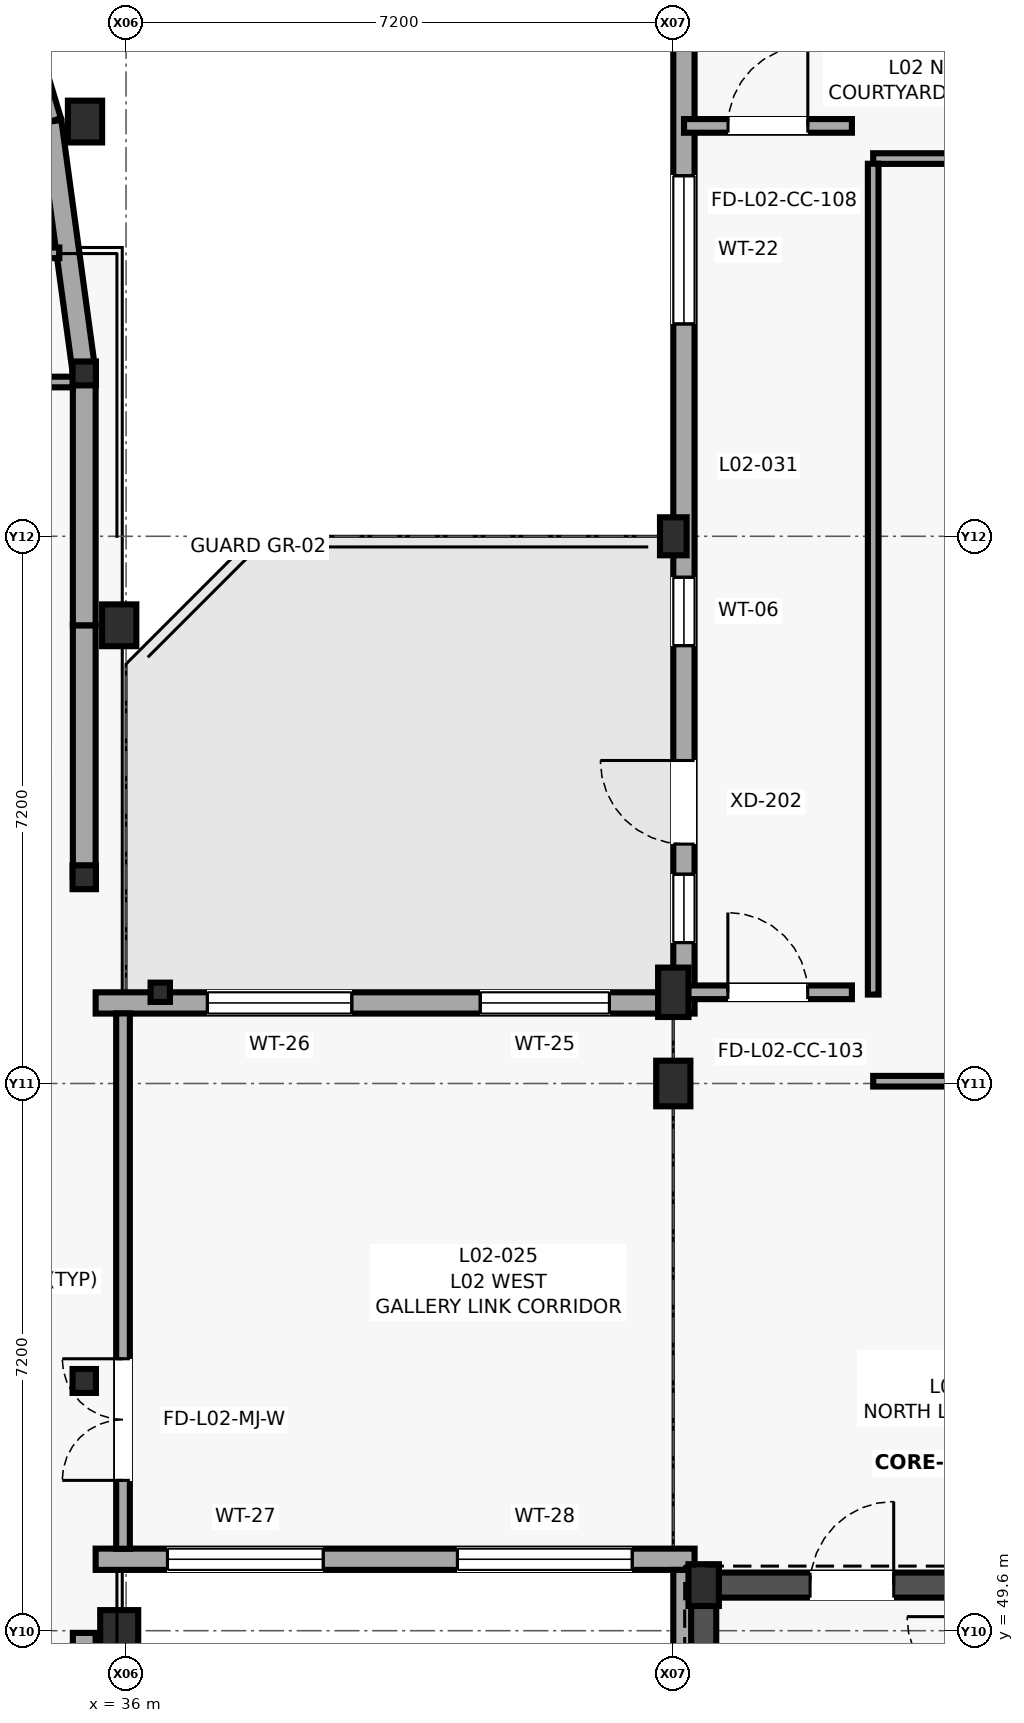
"""IFC4 building model, lengths in metres.
Left out: names, types, materials, properties, quantities, classifications, styles, units other than length and angle.
Written with IfcOpenShell. Run it as: python <this file> out.ifc"""

import sys

from ifc_helpers import new_model, si_unit, direction, frame, frame_2d, origin, origin_2d, place, context, subcontext, project, spatial, rectangle, i_section, extrude, element, fill, save


model = new_model("IFC4")
c1 = context("Model", 3, precision=1e-05, world=origin(), true_north=direction((0.0, 1.0)))
c2 = subcontext(c1, "Body", "Model", "MODEL_VIEW")
j1 = project(units=[si_unit("LENGTHUNIT", "METRE"), si_unit("PLANEANGLEUNIT", "RADIAN")], contexts=[c1])
p1 = place(None, origin())
s1 = spatial("IfcSite", under=j1, at=p1, CompositionType="ELEMENT")
p2 = place(p1, origin())
s2 = spatial("IfcBuilding", under=s1, at=p2, CompositionType="ELEMENT")
p3 = place(p2, frame((0.0, 0.0, 8.2)))
s3 = spatial("IfcBuildingStorey", under=s2, at=p3, CompositionType="ELEMENT", Elevation=8.2)
for number, where, z_axis, x_axis in (
    (1, (35.45, 52.886, 0.0), (0.0, 0.0, 1.0), (1.0, 0.0, 0.0)),
    (2, (35.45, 59.514, 0.0), (0.0, 0.0, 1.0), (1.0, 0.0, 0.0)),
    (3, (35.45, 66.143, 0.0), (0.0, 0.0, 1.0), (1.0, 0.0, 0.0)),
):
    element("IfcColumn", number, at=place(p3, frame(where, z_axis=z_axis, x_axis=x_axis)), inside=s3, PredefinedType="COLUMN", context=c2, shape_type="SweptSolid", body=[
        extrude(i_section(OverallWidth=0.307, OverallDepth=0.314, WebThickness=0.012, FlangeThickness=0.019, FilletRadius=0.015, at=origin_2d()), origin(), (0.0, 0.0, 1.0), 4.0),
    ])
p4 = place(p3, frame((35.46, 69.457, 0.0), z_axis=(0.0, 0.0, 1.0), x_axis=(1.0, 0.0, 0.0)))
e4 = element("IfcColumn", 4, at=p4, inside=s3, PredefinedType="PILASTER", context=c2, shape_type="SweptSolid", body=[
    extrude(rectangle(XDim=0.45, YDim=0.55, at=origin_2d()), origin(), (0.0, 0.0, 1.0), 4.0),
])
p5 = place(p3, frame((35.91, 49.571, 0.0), z_axis=(0.0, 0.0, 1.0), x_axis=(1.0, 0.0, 0.0)))
e5 = element("IfcColumn", 5, at=p5, inside=s3, PredefinedType="PILASTER", context=c2, shape_type="SweptSolid", body=[
    extrude(rectangle(XDim=0.5, YDim=0.6, at=origin_2d()), origin(), (0.0, 0.0, 1.0), 4.0),
])
p6 = place(p3, frame((35.91, 62.829, 0.0), z_axis=(0.0, 0.0, 1.0), x_axis=(1.0, 0.0, 0.0)))
e6 = element("IfcColumn", 6, at=p6, inside=s3, PredefinedType="PILASTER", context=c2, shape_type="SweptSolid", body=[
    extrude(rectangle(XDim=0.45, YDim=0.55, at=origin_2d()), origin(), (0.0, 0.0, 1.0), 4.0),
])
p7 = place(p3, frame((36.45, 58.0, 0.0), z_axis=(0.0, 0.0, 1.0), x_axis=(1.0, 0.0, 0.0)))
e7 = element("IfcColumn", 7, at=p7, inside=s3, PredefinedType="COLUMN", context=c2, shape_type="SweptSolid", body=[
    extrude(i_section(OverallWidth=0.255, OverallDepth=0.254, WebThickness=0.009, FlangeThickness=0.014, FilletRadius=0.013, at=origin_2d()), origin(), (0.0, 0.0, 1.0), 4.0),
])
p8 = place(p3, frame((43.2, 56.8, 0.0), z_axis=(0.0, 0.0, 1.0), x_axis=(1.0, 0.0, 0.0)))
e8 = element("IfcColumn", 8, at=p8, inside=s3, PredefinedType="COLUMN", context=c2, shape_type="SweptSolid", body=[
    extrude(rectangle(XDim=0.45, YDim=0.6, at=origin_2d()), origin(), (0.0, 0.0, 1.0), 4.0),
])
p9 = place(p3, frame((43.2, 58.0, 0.0), z_axis=(0.0, 0.0, 1.0), x_axis=(1.0, 0.0, 0.0)))
e9 = element("IfcColumn", 9, at=p9, inside=s3, PredefinedType="COLUMN", context=c2, shape_type="SweptSolid", body=[
    extrude(rectangle(XDim=0.4, YDim=0.65, at=origin_2d()), origin(), (0.0, 0.0, 1.0), 4.0),
])
p10 = place(p3, frame((43.2, 64.0, 0.0), z_axis=(0.0, 0.0, 1.0), x_axis=(1.0, 0.0, 0.0)))
e10 = element("IfcColumn", 10, at=p10, inside=s3, PredefinedType="PILASTER", context=c2, shape_type="SweptSolid", body=[
    extrude(rectangle(XDim=0.35, YDim=0.5, at=origin_2d()), origin(), (0.0, 0.0, 1.0), 4.0),
])
p11 = place(p3, frame((43.6, 50.2, 0.0), z_axis=(0.0, 0.0, 1.0), x_axis=(1.0, 0.0, 0.0)))
e11 = element("IfcColumn", 11, at=p11, inside=s3, PredefinedType="COLUMN", context=c2, shape_type="SweptSolid", body=[
    extrude(rectangle(XDim=0.4, YDim=0.55, at=origin_2d()), origin(), (0.0, 0.0, 1.0), 4.0),
])
p12 = place(p3, frame((35.45, 46.257, 0.0), z_axis=(0.0, 0.0, 1.0), x_axis=(0.0, 1.0, 0.0)))
e12 = element("IfcWall", 12, at=p12, inside=s3, PredefinedType="SOLIDWALL", context=c2, shape_type="SweptSolid", body=[
    extrude(rectangle(XDim=3.314, YDim=0.3, at=frame_2d((1.657, 0.0))), origin(), (0.0, 0.0, 1.0), 3.505),
])
p13 = place(p3, frame((35.45, 59.514, 0.0), z_axis=(0.0, 0.0, 1.0), x_axis=(0.0, 1.0, 0.0)))
e13 = element("IfcWall", 13, at=p13, inside=s3, PredefinedType="SOLIDWALL", context=c2, shape_type="SweptSolid", body=[
    extrude(rectangle(XDim=3.315, YDim=0.3, at=frame_2d((1.658, 0.0))), origin(), (0.0, 0.0, 1.0), 3.505),
])
p14 = place(p3, frame((35.45, 62.829, 0.0), z_axis=(0.0, 0.0, 1.0), x_axis=(0.0, 1.0, 0.0)))
e14 = element("IfcWall", 14, at=p14, inside=s3, PredefinedType="SOLIDWALL", context=c2, shape_type="SweptSolid", body=[
    extrude(rectangle(XDim=3.314, YDim=0.3, at=frame_2d((1.657, 0.0))), origin(), (0.0, 0.0, 1.0), 3.505),
])
p15 = place(p3, frame((35.45, 66.143, 0.0), z_axis=(0.0, 0.0, 1.0), x_axis=(-0.134539839792, 0.990908185206, 0.0)))
e15 = element("IfcWall", 15, at=p15, inside=s3, PredefinedType="SOLIDWALL", context=c2, shape_type="SweptSolid", body=[
    extrude(rectangle(XDim=3.344, YDim=0.3, at=frame_2d((1.672, 0.0))), origin(), (0.0, 0.0, 1.0), 3.745),
])
p16 = place(p3, frame((35.0, 69.457, 0.0), z_axis=(0.0, 0.0, 1.0), x_axis=(-0.288887509039, 0.957363048755, 0.0)))
e16 = element("IfcWall", 16, at=p16, inside=s3, PredefinedType="SOLIDWALL", context=c2, shape_type="SweptSolid", body=[
    extrude(rectangle(XDim=3.462, YDim=0.3, at=frame_2d((1.731, 0.0))), origin(), (0.0, 0.0, 1.0), 3.745),
])
p17 = place(p3, frame((43.34, 77.538, 0.0), z_axis=(0.0, 0.0, 1.0), x_axis=(0.0, -1.0, 0.0)))
e17 = element("IfcWall", 17, at=p17, inside=s3, PredefinedType="SOLIDWALL", context=c2, shape_type="SweptSolid", body=[
    extrude(rectangle(XDim=19.538, YDim=0.28, at=frame_2d((9.769, 0.0))), origin(), (0.0, 0.0, 1.0), 3.225),
])
p18 = place(p17, frame((16.488, 0.0, 0.0)))
e18 = element("IfcOpeningElement", 18, at=p18, cuts=e17, PredefinedType="OPENING", context=c2, shape_type="SweptSolid", body=[
    extrude(rectangle(XDim=1.1, YDim=2.15, at=frame_2d((0.55, 1.075))), frame((0.0, 0.15, 0.0), z_axis=(0.0, -1.0, 0.0), x_axis=(1.0, 0.0, 0.0)), (0.0, 0.0, 1.0), 0.3),
])
p19 = place(p17, frame((1.354, 0.0, 0.85)))
e19 = element("IfcOpeningElement", 19, at=p19, cuts=e17, PredefinedType="OPENING", context=c2, shape_type="SweptSolid", body=[
    extrude(rectangle(XDim=1.2, YDim=1.65, at=frame_2d((0.6, 0.825))), frame((0.0, 0.15, 0.0), z_axis=(0.0, -1.0, 0.0), x_axis=(1.0, 0.0, 0.0)), (0.0, 0.0, 1.0), 0.3),
])
p20 = place(p17, frame((8.794, 0.0, 1.05)))
e20 = element("IfcOpeningElement", 20, at=p20, cuts=e17, PredefinedType="OPENING", context=c2, shape_type="SweptSolid", body=[
    extrude(rectangle(XDim=1.95, YDim=1.5, at=frame_2d((0.975, 0.75))), frame((0.0, 0.15, 0.0), z_axis=(0.0, -1.0, 0.0), x_axis=(1.0, 0.0, 0.0)), (0.0, 0.0, 1.0), 0.3),
])
p21 = place(p17, frame((14.077, 0.0, 1.05)))
e21 = element("IfcOpeningElement", 21, at=p21, cuts=e17, PredefinedType="OPENING", context=c2, shape_type="SweptSolid", body=[
    extrude(rectangle(XDim=0.9, YDim=1.5, at=frame_2d((0.45, 0.75))), frame((0.0, 0.15, 0.0), z_axis=(0.0, -1.0, 0.0), x_axis=(1.0, 0.0, 0.0)), (0.0, 0.0, 1.0), 0.3),
])
p22 = place(p17, frame((17.984, 0.0, 1.05)))
e22 = element("IfcOpeningElement", 22, at=p22, cuts=e17, PredefinedType="OPENING", context=c2, shape_type="SweptSolid", body=[
    extrude(rectangle(XDim=0.9, YDim=1.5, at=frame_2d((0.45, 0.75))), frame((0.0, 0.15, 0.0), z_axis=(0.0, -1.0, 0.0), x_axis=(1.0, 0.0, 0.0)), (0.0, 0.0, 1.0), 0.3),
])
p23 = place(p3, frame((43.48, 57.86, 0.0), z_axis=(0.0, 0.0, 1.0), x_axis=(-1.0, 0.0, 0.0)))
e23 = element("IfcWall", 23, at=p23, inside=s3, PredefinedType="SOLIDWALL", context=c2, shape_type="SweptSolid", body=[
    extrude(rectangle(XDim=7.88, YDim=0.28, at=frame_2d((3.94, 0.0))), origin(), (0.0, 0.0, 1.0), 2.96),
])
p24 = place(p23, frame((1.12, 0.0, 0.85)))
e24 = element("IfcOpeningElement", 24, at=p24, cuts=e23, PredefinedType="OPENING", context=c2, shape_type="SweptSolid", body=[
    extrude(rectangle(XDim=1.7, YDim=1.75, at=frame_2d((0.85, 0.875))), frame((0.0, 0.15, 0.0), z_axis=(0.0, -1.0, 0.0), x_axis=(1.0, 0.0, 0.0)), (0.0, 0.0, 1.0), 0.3),
])
p25 = place(p23, frame((4.51, 0.0, 0.85)))
e25 = element("IfcOpeningElement", 25, at=p25, cuts=e23, PredefinedType="OPENING", context=c2, shape_type="SweptSolid", body=[
    extrude(rectangle(XDim=1.9, YDim=1.65, at=frame_2d((0.95, 0.825))), frame((0.0, 0.15, 0.0), z_axis=(0.0, -1.0, 0.0), x_axis=(1.0, 0.0, 0.0)), (0.0, 0.0, 1.0), 0.3),
])
p26 = place(p3, frame((35.6, 50.54, 0.0), z_axis=(0.0, 0.0, 1.0), x_axis=(1.0, 0.0, 0.0)))
e26 = element("IfcWall", 26, at=p26, inside=s3, PredefinedType="SOLIDWALL", context=c2, shape_type="SweptSolid", body=[
    extrude(rectangle(XDim=7.88, YDim=0.28, at=frame_2d((3.94, 0.0))), origin(), (0.0, 0.0, 1.0), 3.78),
])
p27 = place(p26, frame((0.945, 0.0, 1.05)))
e27 = element("IfcOpeningElement", 27, at=p27, cuts=e26, PredefinedType="OPENING", context=c2, shape_type="SweptSolid", body=[
    extrude(rectangle(XDim=2.05, YDim=1.55, at=frame_2d((1.025, 0.775))), frame((0.0, 0.15, 0.0), z_axis=(0.0, -1.0, 0.0), x_axis=(1.0, 0.0, 0.0)), (0.0, 0.0, 1.0), 0.3),
])
p28 = place(p26, frame((4.76, 0.0, 1.05)))
e28 = element("IfcOpeningElement", 28, at=p28, cuts=e26, PredefinedType="OPENING", context=c2, shape_type="SweptSolid", body=[
    extrude(rectangle(XDim=2.3, YDim=1.45, at=frame_2d((1.15, 0.725))), frame((0.0, 0.15, 0.0), z_axis=(0.0, -1.0, 0.0), x_axis=(1.0, 0.0, 0.0)), (0.0, 0.0, 1.0), 0.3),
])
p29 = place(p3, frame((43.34, 50.4, 0.0), z_axis=(0.0, 0.0, 1.0), x_axis=(0.0, -1.0, 0.0)))
e29 = element("IfcWall", 29, at=p29, inside=s3, PredefinedType="SOLIDWALL", context=c2, shape_type="SweptSolid", body=[
    extrude(rectangle(XDim=8.12, YDim=0.28, at=frame_2d((4.06, 0.0))), origin(), (0.0, 0.0, 1.0), 3.78),
])
p30 = place(p3, frame((43.435, 50.2, 0.0), z_axis=(0.0, 0.0, 1.0), x_axis=(1.0, 0.0, 0.0)))
e30 = element("IfcWall", 30, at=p30, inside=s3, PredefinedType="SHEAR", context=c2, shape_type="SweptSolid", body=[
    extrude(rectangle(XDim=7.53, YDim=0.33, at=frame_2d((3.765, 0.0))), origin(), (0.0, 0.0, 1.0), 3.78),
])
p31 = place(p30, frame((5.015, 0.0, 0.0)))
e31 = element("IfcOpeningElement", 31, at=p31, cuts=e30, PredefinedType="OPENING", context=c2, shape_type="SweptSolid", body=[
    extrude(rectangle(XDim=1.05, YDim=2.15, at=frame_2d((0.525, 1.075))), frame((0.0, 0.175, 0.0), z_axis=(0.0, -1.0, 0.0), x_axis=(1.0, 0.0, 0.0)), (0.0, 0.0, 1.0), 0.35),
])
p32 = place(p30, frame((1.565, 0.0, 0.0)))
e32 = element("IfcOpeningElement", 32, at=p32, cuts=e30, PredefinedType="OPENING", context=c2, shape_type="SweptSolid", body=[
    extrude(rectangle(XDim=1.1, YDim=2.15, at=frame_2d((0.55, 1.075))), frame((0.0, 0.175, 0.0), z_axis=(0.0, -1.0, 0.0), x_axis=(1.0, 0.0, 0.0)), (0.0, 0.0, 1.0), 0.35),
])
p33 = place(p3, frame((43.6, 42.565, 0.0), z_axis=(0.0, 0.0, 1.0), x_axis=(0.0, 1.0, 0.0)))
e33 = element("IfcWall", 33, at=p33, inside=s3, PredefinedType="SHEAR", context=c2, shape_type="SweptSolid", body=[
    extrude(rectangle(XDim=7.47, YDim=0.33, at=frame_2d((3.735, 0.0))), origin(), (0.0, 0.0, 1.0), 3.78),
])
p34 = place(p3, frame((35.96, 50.678, 0.0), z_axis=(0.0, 0.0, 1.0), x_axis=(0.0, 1.0, 0.0)))
e34 = element("IfcWall", 34, at=p34, inside=s3, PredefinedType="PARTITIONING", context=c2, shape_type="SweptSolid", body=[
    extrude(rectangle(XDim=7.044, YDim=0.18, at=frame_2d((3.522, 0.0))), origin(), (0.0, 0.0, 1.0), 3.78),
])
p35 = place(p34, frame((0.9, 0.0, 0.0)))
e35 = element("IfcOpeningElement", 35, at=p35, cuts=e34, PredefinedType="OPENING", context=c2, shape_type="SweptSolid", body=[
    extrude(rectangle(XDim=1.6, YDim=2.25, at=frame_2d((0.8, 1.125))), frame((0.0, 0.1, 0.0), z_axis=(0.0, -1.0, 0.0), x_axis=(1.0, 0.0, 0.0)), (0.0, 0.0, 1.0), 0.2),
])
p36 = place(p3, frame((43.336, 58.0, 0.0), z_axis=(0.0, 0.0, 1.0), x_axis=(1.0, 0.0, 0.0)))
e36 = element("IfcWall", 36, at=p36, inside=s3, PredefinedType="PARTITIONING", context=c2, shape_type="SweptSolid", body=[
    extrude(rectangle(XDim=2.214, YDim=0.18, at=frame_2d((1.107, 0.0))), origin(), (0.0, 0.0, 1.0), 3.78),
])
p37 = place(p36, frame((0.582, 0.0, 0.0)))
e37 = element("IfcOpeningElement", 37, at=p37, cuts=e36, PredefinedType="OPENING", context=c2, shape_type="SweptSolid", body=[
    extrude(rectangle(XDim=1.05, YDim=2.15, at=frame_2d((0.525, 1.075))), frame((0.0, 0.1, 0.0), z_axis=(0.0, -1.0, 0.0), x_axis=(1.0, 0.0, 0.0)), (0.0, 0.0, 1.0), 0.2),
])
p38 = place(p3, frame((43.341, 69.4, 0.0), z_axis=(0.0, 0.0, 1.0), x_axis=(1.0, 0.0, 0.0)))
e38 = element("IfcWall", 38, at=p38, inside=s3, PredefinedType="PARTITIONING", context=c2, shape_type="SweptSolid", body=[
    extrude(rectangle(XDim=2.209, YDim=0.18, at=frame_2d((1.104, 0.0))), origin(), (0.0, 0.0, 1.0), 3.78),
])
p39 = place(p38, frame((0.579, 0.0, 0.0)))
e39 = element("IfcOpeningElement", 39, at=p39, cuts=e38, PredefinedType="OPENING", context=c2, shape_type="SweptSolid", body=[
    extrude(rectangle(XDim=1.05, YDim=2.15, at=frame_2d((0.525, 1.075))), frame((0.0, 0.1, 0.0), z_axis=(0.0, -1.0, 0.0), x_axis=(1.0, 0.0, 0.0)), (0.0, 0.0, 1.0), 0.2),
])
p40 = place(p3, frame((35.122, 67.73, 0.0), z_axis=(0.0, 0.0, 1.0), x_axis=(-1.0, 0.0, 0.0)))
e40 = element("IfcWall", 40, at=p40, inside=s3, PredefinedType="PARTITIONING", context=c2, shape_type="SweptSolid", body=[
    extrude(rectangle(XDim=5.587, YDim=0.14, at=frame_2d((2.793, 0.0))), origin(), (0.0, 0.0, 1.0), 3.755),
])
p41 = place(p3, frame((33.03, 66.03, 0.0), z_axis=(0.0, 0.0, 1.0), x_axis=(1.0, 0.0, 0.0)))
e41 = element("IfcWall", 41, at=p41, inside=s3, PredefinedType="PARTITIONING", context=c2, shape_type="SweptSolid", body=[
    extrude(rectangle(XDim=2.272, YDim=0.14, at=frame_2d((1.136, 0.0))), origin(), (0.0, 0.0, 1.0), 3.755),
])
p42 = place(p3, frame((63.37, 68.97, 0.0), z_axis=(0.0, 0.0, 1.0), x_axis=(-1.0, 0.0, 0.0)))
e42 = element("IfcWall", 42, at=p42, inside=s3, PredefinedType="PARTITIONING", context=c2, shape_type="SweptSolid", body=[
    extrude(rectangle(XDim=17.54, YDim=0.14, at=frame_2d((8.77, 0.0))), origin(), (0.0, 0.0, 1.0), 3.775),
])
p43 = place(p42, frame((8.245, 0.0, 0.0)))
e43 = element("IfcOpeningElement", 43, at=p43, cuts=e42, PredefinedType="OPENING", context=c2, shape_type="SweptSolid", body=[
    extrude(rectangle(XDim=1.05, YDim=2.1, at=frame_2d((0.525, 1.05))), frame((0.0, 0.08, 0.0), z_axis=(0.0, -1.0, 0.0), x_axis=(1.0, 0.0, 0.0)), (0.0, 0.0, 1.0), 0.16),
])
p44 = place(p42, frame((9.995, 0.0, 1.05)))
e44 = element("IfcOpeningElement", 44, at=p44, cuts=e42, PredefinedType="OPENING", context=c2, shape_type="SweptSolid", body=[
    extrude(rectangle(XDim=1.4, YDim=1.05, at=frame_2d((0.7, 0.525))), frame((0.0, 0.08, 0.0), z_axis=(0.0, -1.0, 0.0), x_axis=(1.0, 0.0, 0.0)), (0.0, 0.0, 1.0), 0.16),
])
p45 = place(p3, frame((45.83, 68.902, 0.0), z_axis=(0.0, 0.0, 1.0), x_axis=(0.0, -1.0, 0.0)))
e45 = element("IfcWall", 45, at=p45, inside=s3, PredefinedType="PARTITIONING", context=c2, shape_type="SweptSolid", body=[
    extrude(rectangle(XDim=10.932, YDim=0.14, at=frame_2d((5.466, 0.0))), origin(), (0.0, 0.0, 1.0), 3.775),
])
p46 = place(p3, frame((45.83, 56.83, 0.0), z_axis=(0.0, 0.0, 1.0), x_axis=(1.0, 0.0, 0.0)))
e46 = element("IfcWall", 46, at=p46, inside=s3, PredefinedType="PARTITIONING", context=c2, shape_type="SweptSolid", body=[
    extrude(rectangle(XDim=5.6, YDim=0.14, at=frame_2d((2.8, 0.0))), origin(), (0.0, 0.0, 1.0), 3.025),
])
p47 = place(p18, frame((1.1, 0.0, 0.0), z_axis=(0.0, 0.0, 1.0), x_axis=(-1.0, 0.0, 0.0)))
e47 = element("IfcDoor", 47, at=p47, inside=s3, OperationType="SINGLE_SWING_LEFT", PredefinedType="DOOR", context=c2, shape_type="SweptSolid", body=[
    extrude(rectangle(XDim=1.1, YDim=2.15, at=frame_2d((0.55, 1.075))), frame((0.0, 0.025, 0.0), z_axis=(0.0, -1.0, 0.0), x_axis=(1.0, 0.0, 0.0)), (0.0, 0.0, 1.0), 0.05),
])
fill(e18, e47)
p48 = place(p20, origin())
e48 = element("IfcWindow", 48, at=p48, inside=s3, PartitioningType="SINGLE_PANEL", PredefinedType="WINDOW", context=c2, shape_type="SweptSolid", body=[
    extrude(rectangle(XDim=1.95, YDim=1.5, at=frame_2d((0.975, 0.75))), frame((0.0, 0.03, 0.0), z_axis=(0.0, -1.0, 0.0), x_axis=(1.0, 0.0, 0.0)), (0.0, 0.0, 1.0), 0.06),
])
fill(e20, e48)
p49 = place(p21, origin())
e49 = element("IfcWindow", 49, at=p49, inside=s3, PartitioningType="SINGLE_PANEL", PredefinedType="WINDOW", context=c2, shape_type="SweptSolid", body=[
    extrude(rectangle(XDim=0.9, YDim=1.5, at=frame_2d((0.45, 0.75))), frame((0.0, 0.03, 0.0), z_axis=(0.0, -1.0, 0.0), x_axis=(1.0, 0.0, 0.0)), (0.0, 0.0, 1.0), 0.06),
])
fill(e21, e49)
p50 = place(p22, origin())
e50 = element("IfcWindow", 50, at=p50, inside=s3, PartitioningType="SINGLE_PANEL", PredefinedType="WINDOW", context=c2, shape_type="SweptSolid", body=[
    extrude(rectangle(XDim=0.9, YDim=1.5, at=frame_2d((0.45, 0.75))), frame((0.0, 0.03, 0.0), z_axis=(0.0, -1.0, 0.0), x_axis=(1.0, 0.0, 0.0)), (0.0, 0.0, 1.0), 0.06),
])
fill(e22, e50)
p51 = place(p24, origin())
e51 = element("IfcWindow", 51, at=p51, inside=s3, PartitioningType="SINGLE_PANEL", PredefinedType="WINDOW", context=c2, shape_type="SweptSolid", body=[
    extrude(rectangle(XDim=1.7, YDim=1.75, at=frame_2d((0.85, 0.875))), frame((0.0, 0.03, 0.0), z_axis=(0.0, -1.0, 0.0), x_axis=(1.0, 0.0, 0.0)), (0.0, 0.0, 1.0), 0.06),
])
fill(e24, e51)
p52 = place(p25, origin())
e52 = element("IfcWindow", 52, at=p52, inside=s3, PartitioningType="SINGLE_PANEL", PredefinedType="WINDOW", context=c2, shape_type="SweptSolid", body=[
    extrude(rectangle(XDim=1.9, YDim=1.65, at=frame_2d((0.95, 0.825))), frame((0.0, 0.03, 0.0), z_axis=(0.0, -1.0, 0.0), x_axis=(1.0, 0.0, 0.0)), (0.0, 0.0, 1.0), 0.06),
])
fill(e25, e52)
p53 = place(p27, origin())
e53 = element("IfcWindow", 53, at=p53, inside=s3, PartitioningType="SINGLE_PANEL", PredefinedType="WINDOW", context=c2, shape_type="SweptSolid", body=[
    extrude(rectangle(XDim=2.05, YDim=1.55, at=frame_2d((1.025, 0.775))), frame((0.0, 0.03, 0.0), z_axis=(0.0, -1.0, 0.0), x_axis=(1.0, 0.0, 0.0)), (0.0, 0.0, 1.0), 0.06),
])
fill(e27, e53)
p54 = place(p28, origin())
e54 = element("IfcWindow", 54, at=p54, inside=s3, PartitioningType="SINGLE_PANEL", PredefinedType="WINDOW", context=c2, shape_type="SweptSolid", body=[
    extrude(rectangle(XDim=2.3, YDim=1.45, at=frame_2d((1.15, 0.725))), frame((0.0, 0.03, 0.0), z_axis=(0.0, -1.0, 0.0), x_axis=(1.0, 0.0, 0.0)), (0.0, 0.0, 1.0), 0.06),
])
fill(e28, e54)
p55 = place(p32, origin())
e55 = element("IfcDoor", 55, at=p55, inside=s3, OperationType="SINGLE_SWING_RIGHT", PredefinedType="DOOR", context=c2, shape_type="SweptSolid", body=[
    extrude(rectangle(XDim=1.1, YDim=2.15, at=frame_2d((0.55, 1.075))), frame((0.0, 0.025, 0.0), z_axis=(0.0, -1.0, 0.0), x_axis=(1.0, 0.0, 0.0)), (0.0, 0.0, 1.0), 0.05),
])
fill(e32, e55)
p56 = place(p35, origin())
e56 = element("IfcDoor", 56, at=p56, inside=s3, OperationType="DOUBLE_DOOR_SINGLE_SWING", PredefinedType="DOOR", context=c2, shape_type="SweptSolid", body=[
    extrude(rectangle(XDim=1.6, YDim=2.25, at=frame_2d((0.8, 1.125))), frame((0.0, 0.025, 0.0), z_axis=(0.0, -1.0, 0.0), x_axis=(1.0, 0.0, 0.0)), (0.0, 0.0, 1.0), 0.05),
])
fill(e35, e56)
p57 = place(p37, origin())
e57 = element("IfcDoor", 57, at=p57, inside=s3, OperationType="SINGLE_SWING_LEFT", PredefinedType="DOOR", context=c2, shape_type="SweptSolid", body=[
    extrude(rectangle(XDim=1.05, YDim=2.15, at=frame_2d((0.525, 1.075))), frame((0.0, 0.025, 0.0), z_axis=(0.0, -1.0, 0.0), x_axis=(1.0, 0.0, 0.0)), (0.0, 0.0, 1.0), 0.05),
])
fill(e37, e57)
p58 = place(p39, origin())
e58 = element("IfcDoor", 58, at=p58, inside=s3, OperationType="SINGLE_SWING_RIGHT", PredefinedType="DOOR", context=c2, shape_type="SweptSolid", body=[
    extrude(rectangle(XDim=1.05, YDim=2.15, at=frame_2d((0.525, 1.075))), frame((0.0, 0.025, 0.0), z_axis=(0.0, -1.0, 0.0), x_axis=(1.0, 0.0, 0.0)), (0.0, 0.0, 1.0), 0.05),
])
fill(e39, e58)
save(model, sys.argv[1])
